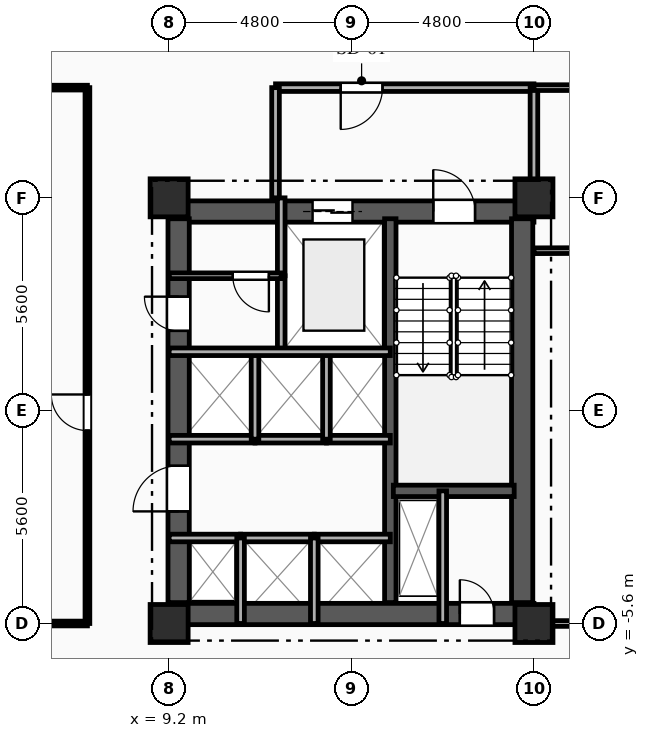
"""IFC4 building model, lengths in metres.
Left out: names, types, materials, properties, quantities, classifications, styles, units other than length and angle.
Written with IfcOpenShell. Run it as: python <this file> out.ifc"""

import sys

from ifc_helpers import new_model, si_unit, direction, frame, frame_2d, origin, origin_2d, place, context, subcontext, project, spatial, rectangle, extrude, element, fill, save


model = new_model("IFC4")
c1 = context("Model", 3, precision=1e-05, world=origin(), true_north=direction((0.0, 1.0)))
c2 = subcontext(c1, "Body", "Model", "MODEL_VIEW")
j1 = project(units=[si_unit("LENGTHUNIT", "METRE"), si_unit("PLANEANGLEUNIT", "RADIAN")], contexts=[c1])
p1 = place(None, origin())
s1 = spatial("IfcSite", under=j1, at=p1, CompositionType="ELEMENT")
p2 = place(p1, origin())
s2 = spatial("IfcBuilding", under=s1, at=p2, CompositionType="ELEMENT")
p3 = place(p2, frame((0.0, 0.0, 109.15)))
s3 = spatial("IfcBuildingStorey", under=s2, at=p3, CompositionType="ELEMENT", Elevation=109.15)
for number, where, z_axis, x_axis in (
    (1, (9.2, -5.6, 0.0), (0.0, 0.0, 1.0), (1.0, 0.0, 0.0)),
    (2, (9.2, 5.6, 0.0), (0.0, 0.0, 1.0), (1.0, 0.0, 0.0)),
    (3, (18.8, -5.6, 0.0), (0.0, 0.0, 1.0), (1.0, 0.0, 0.0)),
    (4, (18.8, 5.6, 0.0), (0.0, 0.0, 1.0), (1.0, 0.0, 0.0)),
):
    element("IfcColumn", number, at=place(p3, frame(where, z_axis=z_axis, x_axis=x_axis)), inside=s3, PredefinedType="COLUMN", context=c2, shape_type="SweptSolid", body=[
        extrude(rectangle(XDim=1.0, YDim=1.0, at=origin_2d()), origin(), (0.0, 0.0, 1.0), 3.35),
    ])
p4 = place(p3, frame((9.2, 5.24, 0.0), z_axis=(0.0, 0.0, 1.0), x_axis=(1.0, 0.0, 0.0)))
e5 = element("IfcWall", 5, at=p4, inside=s3, PredefinedType="SHEAR", context=c2, shape_type="SweptSolid", body=[
    extrude(rectangle(XDim=9.6, YDim=0.56, at=frame_2d((4.8, 0.0))), origin(), (0.0, 0.0, 1.0), 3.045),
])
p5 = place(p4, frame((6.95, 0.0, 0.0)))
e6 = element("IfcOpeningElement", 6, at=p5, cuts=e5, PredefinedType="OPENING", context=c2, shape_type="SweptSolid", body=[
    extrude(rectangle(XDim=1.1, YDim=2.15, at=frame_2d((0.55, 1.075))), frame((0.0, 0.29, 0.0), z_axis=(0.0, -1.0, 0.0), x_axis=(1.0, 0.0, 0.0)), (0.0, 0.0, 1.0), 0.58),
])
p6 = place(p4, frame((3.775, 0.0, 0.0)))
e7 = element("IfcOpeningElement", 7, at=p6, cuts=e5, PredefinedType="OPENING", context=c2, shape_type="SweptSolid", body=[
    extrude(rectangle(XDim=1.05, YDim=2.1, at=frame_2d((0.525, 1.05))), frame((0.0, 0.29, 0.0), z_axis=(0.0, -1.0, 0.0), x_axis=(1.0, 0.0, 0.0)), (0.0, 0.0, 1.0), 0.58),
])
p7 = place(p3, frame((9.2, -5.35, 0.0), z_axis=(0.0, 0.0, 1.0), x_axis=(1.0, 0.0, 0.0)))
e8 = element("IfcWall", 8, at=p7, inside=s3, PredefinedType="SHEAR", context=c2, shape_type="SweptSolid", body=[
    extrude(rectangle(XDim=9.6, YDim=0.56, at=frame_2d((4.8, 0.0))), origin(), (0.0, 0.0, 1.0), 3.045),
])
p8 = place(p7, frame((7.65, 0.0, 0.0)))
e9 = element("IfcOpeningElement", 9, at=p8, cuts=e8, PredefinedType="OPENING", context=c2, shape_type="SweptSolid", body=[
    extrude(rectangle(XDim=0.9, YDim=2.1, at=frame_2d((0.45, 1.05))), frame((0.0, 0.29, 0.0), z_axis=(0.0, -1.0, 0.0), x_axis=(1.0, 0.0, 0.0)), (0.0, 0.0, 1.0), 0.58),
])
p9 = place(p3, frame((9.45, -5.05, 0.0), z_axis=(0.0, 0.0, 1.0), x_axis=(0.0, 1.0, 0.0)))
e10 = element("IfcWall", 10, at=p9, inside=s3, PredefinedType="SHEAR", context=c2, shape_type="SweptSolid", body=[
    extrude(rectangle(XDim=10.1, YDim=0.56, at=frame_2d((5.05, 0.0))), origin(), (0.0, 0.0, 1.0), 3.045),
])
p10 = place(p9, frame((7.15, 0.0, 0.0)))
e11 = element("IfcOpeningElement", 11, at=p10, cuts=e10, PredefinedType="OPENING", context=c2, shape_type="SweptSolid", body=[
    extrude(rectangle(XDim=0.9, YDim=2.1, at=frame_2d((0.45, 1.05))), frame((0.0, 0.29, 0.0), z_axis=(0.0, -1.0, 0.0), x_axis=(1.0, 0.0, 0.0)), (0.0, 0.0, 1.0), 0.58),
])
p11 = place(p9, frame((2.4, 0.0, 0.0)))
e12 = element("IfcOpeningElement", 12, at=p11, cuts=e10, PredefinedType="OPENING", context=c2, shape_type="SweptSolid", body=[
    extrude(rectangle(XDim=1.2, YDim=2.15, at=frame_2d((0.6, 1.075))), frame((0.0, 0.29, 0.0), z_axis=(0.0, -1.0, 0.0), x_axis=(1.0, 0.0, 0.0)), (0.0, 0.0, 1.0), 0.58),
])
p12 = place(p3, frame((18.49, -5.05, 0.0), z_axis=(0.0, 0.0, 1.0), x_axis=(0.0, 1.0, 0.0)))
e13 = element("IfcWall", 13, at=p12, inside=s3, PredefinedType="SHEAR", context=c2, shape_type="SweptSolid", body=[
    extrude(rectangle(XDim=10.1, YDim=0.56, at=frame_2d((5.05, 0.0))), origin(), (0.0, 0.0, 1.0), 3.045),
])
p13 = place(p3, frame((15.02, -5.05, 0.0), z_axis=(0.0, 0.0, 1.0), x_axis=(0.0, 1.0, 0.0)))
e14 = element("IfcWall", 14, at=p13, inside=s3, PredefinedType="SHEAR", context=c2, shape_type="SweptSolid", body=[
    extrude(rectangle(XDim=10.1, YDim=0.3, at=frame_2d((5.05, 0.0))), origin(), (0.0, 0.0, 1.0), 3.045),
])
p14 = place(p3, frame((15.1, -2.11, 0.0), z_axis=(0.0, 0.0, 1.0), x_axis=(1.0, 0.0, 0.0)))
e15 = element("IfcWall", 15, at=p14, inside=s3, PredefinedType="SHEAR", context=c2, shape_type="SweptSolid", body=[
    extrude(rectangle(XDim=3.18, YDim=0.3, at=frame_2d((1.59, 0.0))), origin(), (0.0, 0.0, 1.0), 3.045),
])
p15 = place(p3, frame((16.4, -2.11, 0.0), z_axis=(0.0, 0.0, 1.0), x_axis=(0.0, -1.0, 0.0)))
e16 = element("IfcWall", 16, at=p15, inside=s3, PredefinedType="PARTITIONING", context=c2, shape_type="SweptSolid", body=[
    extrude(rectangle(XDim=3.49, YDim=0.2, at=frame_2d((1.745, 0.0))), origin(), (0.0, 0.0, 1.0), 3.045),
])
p16 = place(p3, frame((12.15, 3.55, 0.0), z_axis=(0.0, 0.0, 1.0), x_axis=(0.0, -1.0, 0.0)))
e17 = element("IfcWall", 17, at=p16, inside=s3, PredefinedType="PARTITIONING", context=c2, shape_type="SweptSolid", body=[
    extrude(rectangle(XDim=2.0, YDim=0.2, at=frame_2d((1.0, 0.0))), origin(), (0.0, 0.0, 1.0), 3.045),
])
p17 = place(p3, frame((12.15, 5.6, 0.0), z_axis=(0.0, 0.0, 1.0), x_axis=(0.0, -1.0, 0.0)))
e18 = element("IfcWall", 18, at=p17, inside=s3, PredefinedType="PARTITIONING", context=c2, shape_type="SweptSolid", body=[
    extrude(rectangle(XDim=2.05, YDim=0.2, at=frame_2d((1.025, 0.0))), origin(), (0.0, 0.0, 1.0), 3.045),
])
p18 = place(p3, frame((18.8, 8.5, 0.0), z_axis=(0.0, 0.0, 1.0), x_axis=(-1.0, 0.0, 0.0)))
e19 = element("IfcWall", 19, at=p18, inside=s3, PredefinedType="PARTITIONING", context=c2, shape_type="SweptSolid", body=[
    extrude(rectangle(XDim=6.8, YDim=0.2, at=frame_2d((3.4, 0.0))), origin(), (0.0, 0.0, 1.0), 3.045),
])
p19 = place(p18, frame((3.985, 0.0, 0.0)))
e20 = element("IfcOpeningElement", 20, at=p19, cuts=e19, PredefinedType="OPENING", context=c2, shape_type="SweptSolid", body=[
    extrude(rectangle(XDim=1.1, YDim=2.15, at=frame_2d((0.55, 1.075))), frame((0.0, 0.11, 0.0), z_axis=(0.0, -1.0, 0.0), x_axis=(1.0, 0.0, 0.0)), (0.0, 0.0, 1.0), 0.22),
])
p20 = place(p3, frame((12.0, 8.5, 0.0), z_axis=(0.0, 0.0, 1.0), x_axis=(0.0, -1.0, 0.0)))
e21 = element("IfcWall", 21, at=p20, inside=s3, PredefinedType="PARTITIONING", context=c2, shape_type="SweptSolid", body=[
    extrude(rectangle(XDim=2.9, YDim=0.2, at=frame_2d((1.45, 0.0))), origin(), (0.0, 0.0, 1.0), 3.045),
])
p21 = place(p3, frame((18.8, 5.6, 0.0), z_axis=(0.0, 0.0, 1.0), x_axis=(0.0, 1.0, 0.0)))
e22 = element("IfcWall", 22, at=p21, inside=s3, PredefinedType="PARTITIONING", context=c2, shape_type="SweptSolid", body=[
    extrude(rectangle(XDim=2.9, YDim=0.2, at=frame_2d((1.45, 0.0))), origin(), (0.0, 0.0, 1.0), 2.53),
])
p22 = place(p3, frame((12.15, 3.55, 0.0), z_axis=(0.0, 0.0, 1.0), x_axis=(-1.0, 0.0, 0.0)))
e23 = element("IfcWall", 23, at=p22, inside=s3, PredefinedType="PARTITIONING", context=c2, shape_type="SweptSolid", body=[
    extrude(rectangle(XDim=2.95, YDim=0.15, at=frame_2d((1.475, 0.0))), origin(), (0.0, 0.0, 1.0), 3.045),
])
p23 = place(p22, frame((0.325, 0.0, 0.0)))
e24 = element("IfcOpeningElement", 24, at=p23, cuts=e23, PredefinedType="OPENING", context=c2, shape_type="SweptSolid", body=[
    extrude(rectangle(XDim=0.95, YDim=2.1, at=frame_2d((0.475, 1.05))), frame((0.0, 0.085, 0.0), z_axis=(0.0, -1.0, 0.0), x_axis=(1.0, 0.0, 0.0)), (0.0, 0.0, 1.0), 0.17),
])
p24 = place(p3, frame((9.2, -3.35, 0.0), z_axis=(0.0, 0.0, 1.0), x_axis=(1.0, 0.0, 0.0)))
e25 = element("IfcWall", 25, at=p24, inside=s3, PredefinedType="PARTITIONING", context=c2, shape_type="SweptSolid", body=[
    extrude(rectangle(XDim=1.88, YDim=0.2, at=frame_2d((0.94, 0.0))), origin(), (0.0, 0.0, 1.0), 2.76),
])
p25 = place(p3, frame((11.08, -3.35, 0.0), z_axis=(0.0, 0.0, 1.0), x_axis=(1.0, 0.0, 0.0)))
e26 = element("IfcWall", 26, at=p25, inside=s3, PredefinedType="PARTITIONING", context=c2, shape_type="SweptSolid", body=[
    extrude(rectangle(XDim=1.94, YDim=0.2, at=frame_2d((0.97, 0.0))), origin(), (0.0, 0.0, 1.0), 3.045),
])
p26 = place(p3, frame((13.02, -3.35, 0.0), z_axis=(0.0, 0.0, 1.0), x_axis=(1.0, 0.0, 0.0)))
e27 = element("IfcWall", 27, at=p26, inside=s3, PredefinedType="PARTITIONING", context=c2, shape_type="SweptSolid", body=[
    extrude(rectangle(XDim=2.0, YDim=0.2, at=frame_2d((1.0, 0.0))), origin(), (0.0, 0.0, 1.0), 3.045),
])
p27 = place(p3, frame((11.46, -0.75, 0.0), z_axis=(0.0, 0.0, 1.0), x_axis=(-1.0, 0.0, 0.0)))
e28 = element("IfcWall", 28, at=p27, inside=s3, PredefinedType="PARTITIONING", context=c2, shape_type="SweptSolid", body=[
    extrude(rectangle(XDim=2.26, YDim=0.2, at=frame_2d((1.13, 0.0))), origin(), (0.0, 0.0, 1.0), 3.045),
])
p28 = place(p3, frame((13.34, -0.75, 0.0), z_axis=(0.0, 0.0, 1.0), x_axis=(-1.0, 0.0, 0.0)))
e29 = element("IfcWall", 29, at=p28, inside=s3, PredefinedType="PARTITIONING", context=c2, shape_type="SweptSolid", body=[
    extrude(rectangle(XDim=1.88, YDim=0.2, at=frame_2d((0.94, 0.0))), origin(), (0.0, 0.0, 1.0), 3.045),
])
p29 = place(p3, frame((15.02, -0.75, 0.0), z_axis=(0.0, 0.0, 1.0), x_axis=(-1.0, 0.0, 0.0)))
e30 = element("IfcWall", 30, at=p29, inside=s3, PredefinedType="PARTITIONING", context=c2, shape_type="SweptSolid", body=[
    extrude(rectangle(XDim=1.68, YDim=0.2, at=frame_2d((0.84, 0.0))), origin(), (0.0, 0.0, 1.0), 3.045),
])
for number, where, z_axis, x_axis in (
    (31, (11.08, -5.6, 0.0), (0.0, 0.0, 1.0), (0.0, 1.0, 0.0)),
    (32, (13.02, -5.6, 0.0), (0.0, 0.0, 1.0), (0.0, 1.0, 0.0)),
):
    element("IfcWall", number, at=place(p3, frame(where, z_axis=z_axis, x_axis=x_axis)), inside=s3, PredefinedType="PARTITIONING", context=c2, shape_type="SweptSolid", body=[
        extrude(rectangle(XDim=2.25, YDim=0.2, at=frame_2d((1.125, 0.0))), origin(), (0.0, 0.0, 1.0), 3.045),
    ])
for number, where, z_axis, x_axis in (
    (33, (11.46, -0.75, 0.0), (0.0, 0.0, 1.0), (0.0, 1.0, 0.0)),
    (34, (13.34, -0.75, 0.0), (0.0, 0.0, 1.0), (0.0, 1.0, 0.0)),
):
    element("IfcWall", number, at=place(p3, frame(where, z_axis=z_axis, x_axis=x_axis)), inside=s3, PredefinedType="PARTITIONING", context=c2, shape_type="SweptSolid", body=[
        extrude(rectangle(XDim=2.3, YDim=0.2, at=frame_2d((1.15, 0.0))), origin(), (0.0, 0.0, 1.0), 3.045),
    ])
p30 = place(p3, frame((23.0, 8.5, 0.0), z_axis=(0.0, 0.0, 1.0), x_axis=(-1.0, 0.0, 0.0)))
e35 = element("IfcWall", 35, at=p30, inside=s3, PredefinedType="PARTITIONING", context=c2, shape_type="SweptSolid", body=[
    extrude(rectangle(XDim=4.2, YDim=0.15, at=frame_2d((2.1, 0.0))), origin(), (0.0, 0.0, 1.0), 3.045),
])
p31 = place(p30, frame((0.829, 0.0, 0.0)))
e36 = element("IfcOpeningElement", 36, at=p31, cuts=e35, PredefinedType="OPENING", context=c2, shape_type="SweptSolid", body=[
    extrude(rectangle(XDim=1.05, YDim=2.15, at=frame_2d((0.525, 1.075))), frame((0.0, 0.085, 0.0), z_axis=(0.0, -1.0, 0.0), x_axis=(1.0, 0.0, 0.0)), (0.0, 0.0, 1.0), 0.17),
])
p32 = place(p3, frame((7.05, 8.5, 0.0), z_axis=(0.0, 0.0, 1.0), x_axis=(-1.0, 0.0, 0.0)))
e37 = element("IfcWall", 37, at=p32, inside=s3, PredefinedType="PARTITIONING", context=c2, shape_type="SweptSolid", body=[
    extrude(rectangle(XDim=7.05, YDim=0.125, at=frame_2d((3.525, 0.0))), origin(), (0.0, 0.0, 1.0), 3.045),
])
p33 = place(p3, frame((18.8, -5.6, 0.0), z_axis=(0.0, 0.0, 1.0), x_axis=(1.0, 0.0, 0.0)))
e38 = element("IfcWall", 38, at=p33, inside=s3, PredefinedType="PARTITIONING", context=c2, shape_type="SweptSolid", body=[
    extrude(rectangle(XDim=4.2, YDim=0.15, at=frame_2d((2.1, 0.0))), origin(), (0.0, 0.0, 1.0), 2.53),
])
p34 = place(p33, frame((2.321, 0.0, 0.0)))
e39 = element("IfcOpeningElement", 39, at=p34, cuts=e38, PredefinedType="OPENING", context=c2, shape_type="SweptSolid", body=[
    extrude(rectangle(XDim=1.05, YDim=2.15, at=frame_2d((0.525, 1.075))), frame((0.0, 0.085, 0.0), z_axis=(0.0, -1.0, 0.0), x_axis=(1.0, 0.0, 0.0)), (0.0, 0.0, 1.0), 0.17),
])
p35 = place(p3, frame((0.0, -5.6, 0.0), z_axis=(0.0, 0.0, 1.0), x_axis=(1.0, 0.0, 0.0)))
e40 = element("IfcWall", 40, at=p35, inside=s3, PredefinedType="PARTITIONING", context=c2, shape_type="SweptSolid", body=[
    extrude(rectangle(XDim=7.05, YDim=0.125, at=frame_2d((3.525, 0.0))), origin(), (0.0, 0.0, 1.0), 2.53),
])
p36 = place(p3, frame((7.05, -5.6, 0.0), z_axis=(0.0, 0.0, 1.0), x_axis=(0.0, 1.0, 0.0)))
e41 = element("IfcWall", 41, at=p36, inside=s3, PredefinedType="PARTITIONING", context=c2, shape_type="SweptSolid", body=[
    extrude(rectangle(XDim=14.1, YDim=0.125, at=frame_2d((7.05, 0.0))), origin(), (0.0, 0.0, 1.0), 3.045),
])
p37 = place(p36, frame((5.076, 0.0, 0.0)))
e42 = element("IfcOpeningElement", 42, at=p37, cuts=e41, PredefinedType="OPENING", context=c2, shape_type="SweptSolid", body=[
    extrude(rectangle(XDim=0.95, YDim=2.1, at=frame_2d((0.475, 1.05))), frame((0.0, 0.073, 0.0), z_axis=(0.0, -1.0, 0.0), x_axis=(1.0, 0.0, 0.0)), (0.0, 0.0, 1.0), 0.145),
])
p38 = place(p3, frame((18.8, 4.208, 0.0), z_axis=(0.0, 0.0, 1.0), x_axis=(0.9999942944, 0.003378042094, 0.0)))
e43 = element("IfcWall", 43, at=p38, inside=s3, PredefinedType="PARTITIONING", context=c2, shape_type="SweptSolid", body=[
    extrude(rectangle(XDim=13.009, YDim=0.15, at=frame_2d((6.504, 0.0))), origin(), (0.0, 0.0, 1.0), 3.045),
])
p39 = place(p3, frame((9.2, 1.55, 0.0), z_axis=(0.0, 0.0, 1.0), x_axis=(1.0, 0.0, 0.0)))
e44 = element("IfcWall", 44, at=p39, inside=s3, PredefinedType="PARTITIONING", context=c2, shape_type="SweptSolid", body=[
    extrude(rectangle(XDim=5.82, YDim=0.2, at=frame_2d((2.91, 0.0))), origin(), (0.0, 0.0, 1.0), 3.045),
])
p40 = place(p5, origin())
e45 = element("IfcDoor", 45, at=p40, inside=s3, OperationType="SINGLE_SWING_LEFT", PredefinedType="DOOR", context=c2, shape_type="SweptSolid", body=[
    extrude(rectangle(XDim=1.1, YDim=2.15, at=frame_2d((0.55, 1.075))), frame((0.0, 0.025, 0.0), z_axis=(0.0, -1.0, 0.0), x_axis=(1.0, 0.0, 0.0)), (0.0, 0.0, 1.0), 0.05),
])
fill(e6, e45)
p41 = place(p6, origin())
e46 = element("IfcDoor", 46, at=p41, inside=s3, OperationType="DOUBLE_DOOR_SLIDING", PredefinedType="DOOR", context=c2, shape_type="SweptSolid", body=[
    extrude(rectangle(XDim=1.05, YDim=2.1, at=frame_2d((0.525, 1.05))), frame((0.0, 0.025, 0.0), z_axis=(0.0, -1.0, 0.0), x_axis=(1.0, 0.0, 0.0)), (0.0, 0.0, 1.0), 0.05),
])
fill(e7, e46)
p42 = place(p8, origin())
e47 = element("IfcDoor", 47, at=p42, inside=s3, OperationType="SINGLE_SWING_LEFT", PredefinedType="DOOR", context=c2, shape_type="SweptSolid", body=[
    extrude(rectangle(XDim=0.9, YDim=2.1, at=frame_2d((0.45, 1.05))), frame((0.0, 0.025, 0.0), z_axis=(0.0, -1.0, 0.0), x_axis=(1.0, 0.0, 0.0)), (0.0, 0.0, 1.0), 0.05),
])
fill(e9, e47)
p43 = place(p19, origin())
e48 = element("IfcDoor", 48, at=p43, inside=s3, OperationType="SINGLE_SWING_RIGHT", PredefinedType="DOOR", context=c2, shape_type="SweptSolid", body=[
    extrude(rectangle(XDim=1.1, YDim=2.15, at=frame_2d((0.55, 1.075))), frame((0.0, 0.025, 0.0), z_axis=(0.0, -1.0, 0.0), x_axis=(1.0, 0.0, 0.0)), (0.0, 0.0, 1.0), 0.05),
])
fill(e20, e48)
p44 = place(p23, origin())
e49 = element("IfcDoor", 49, at=p44, inside=s3, OperationType="SINGLE_SWING_LEFT", PredefinedType="DOOR", context=c2, shape_type="SweptSolid", body=[
    extrude(rectangle(XDim=0.95, YDim=2.1, at=frame_2d((0.475, 1.05))), frame((0.0, 0.025, 0.0), z_axis=(0.0, -1.0, 0.0), x_axis=(1.0, 0.0, 0.0)), (0.0, 0.0, 1.0), 0.05),
])
fill(e24, e49)
p45 = place(p10, origin())
e50 = element("IfcDoor", 50, at=p45, inside=s3, OperationType="SINGLE_SWING_RIGHT", PredefinedType="DOOR", context=c2, shape_type="SweptSolid", body=[
    extrude(rectangle(XDim=0.9, YDim=2.1, at=frame_2d((0.45, 1.05))), frame((0.0, 0.025, 0.0), z_axis=(0.0, -1.0, 0.0), x_axis=(1.0, 0.0, 0.0)), (0.0, 0.0, 1.0), 0.05),
])
fill(e11, e50)
p46 = place(p11, origin())
e51 = element("IfcDoor", 51, at=p46, inside=s3, OperationType="SINGLE_SWING_LEFT", PredefinedType="DOOR", context=c2, shape_type="SweptSolid", body=[
    extrude(rectangle(XDim=1.2, YDim=2.15, at=frame_2d((0.6, 1.075))), frame((0.0, 0.025, 0.0), z_axis=(0.0, -1.0, 0.0), x_axis=(1.0, 0.0, 0.0)), (0.0, 0.0, 1.0), 0.05),
])
fill(e12, e51)
p47 = place(p37, origin())
e52 = element("IfcDoor", 52, at=p47, inside=s3, OperationType="SINGLE_SWING_RIGHT", PredefinedType="DOOR", context=c2, shape_type="SweptSolid", body=[
    extrude(rectangle(XDim=0.95, YDim=2.1, at=frame_2d((0.475, 1.05))), frame((0.0, 0.025, 0.0), z_axis=(0.0, -1.0, 0.0), x_axis=(1.0, 0.0, 0.0)), (0.0, 0.0, 1.0), 0.05),
])
fill(e42, e52)
save(model, sys.argv[1])
